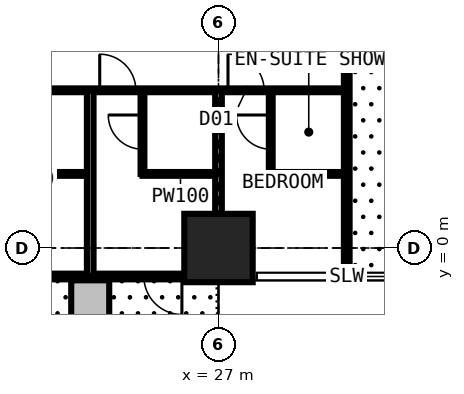
"""IFC4 building model, lengths in metres.
Left out: names, types, materials, properties, quantities, classifications, styles, units other than length and angle.
Written with IfcOpenShell. Run it as: python <this file> out.ifc"""

import sys

from ifc_helpers import new_model, si_unit, direction, frame, frame_2d, origin, origin_2d, place, context, subcontext, project, spatial, rectangle, extrude, element, fill, save


model = new_model("IFC4")
c1 = context("Model", 3, precision=1e-05, world=origin(), true_north=direction((0.0, 1.0)))
c2 = subcontext(c1, "Body", "Model", "MODEL_VIEW")
j1 = project(units=[si_unit("LENGTHUNIT", "METRE"), si_unit("PLANEANGLEUNIT", "RADIAN")], contexts=[c1])
p1 = place(None, origin())
s1 = spatial("IfcSite", under=j1, at=p1, CompositionType="ELEMENT")
p2 = place(p1, origin())
s2 = spatial("IfcBuilding", under=s1, at=p2, CompositionType="ELEMENT")
p3 = place(p2, frame((0.0, 0.0, 46.8)))
s3 = spatial("IfcBuildingStorey", under=s2, at=p3, CompositionType="ELEMENT", Elevation=46.8)
p4 = place(p3, frame((27.0, 0.0, 0.0), z_axis=(0.0, 0.0, 1.0), x_axis=(1.0, 0.0, 0.0)))
e1 = element("IfcColumn", 1, at=p4, inside=s3, PredefinedType="COLUMN", context=c2, shape_type="SweptSolid", body=[
    extrude(rectangle(XDim=1.8, YDim=1.8, at=origin_2d()), origin(), (0.0, 0.0, 1.0), 3.6),
])
p5 = place(p3, frame((27.0, -0.75, 0.0), z_axis=(0.0, 0.0, 1.0), x_axis=(-1.0, 0.0, 0.0)))
e2 = element("IfcWall", 2, at=p5, inside=s3, PredefinedType="SOLIDWALL", context=c2, shape_type="SweptSolid", body=[
    extrude(rectangle(XDim=6.75, YDim=0.15, at=frame_2d((3.375, 0.0))), origin(), (0.0, 0.0, 1.0), 3.375),
])
p6 = place(p5, frame((0.962, 0.0, 0.0)))
e3 = element("IfcOpeningElement", 3, at=p6, cuts=e2, PredefinedType="OPENING", context=c2, shape_type="SweptSolid", body=[
    extrude(rectangle(XDim=1.0, YDim=2.2, at=frame_2d((0.5, 1.1))), frame((0.0, 0.085, 0.0), z_axis=(0.0, -1.0, 0.0), x_axis=(1.0, 0.0, 0.0)), (0.0, 0.0, 1.0), 0.17),
])
p7 = place(p5, frame((2.025, 0.0, 0.9)))
e4 = element("IfcOpeningElement", 4, at=p7, cuts=e2, PredefinedType="OPENING", context=c2, shape_type="SweptSolid", body=[
    extrude(rectangle(XDim=1.2, YDim=1.8, at=frame_2d((0.6, 0.9))), frame((0.0, 0.085, 0.0), z_axis=(0.0, -1.0, 0.0), x_axis=(1.0, 0.0, 0.0)), (0.0, 0.0, 1.0), 0.17),
])
p8 = place(p5, frame((4.788, 0.0, 0.0)))
e5 = element("IfcOpeningElement", 5, at=p8, cuts=e2, PredefinedType="OPENING", context=c2, shape_type="SweptSolid", body=[
    extrude(rectangle(XDim=1.0, YDim=2.2, at=frame_2d((0.5, 1.1))), frame((0.0, 0.085, 0.0), z_axis=(0.0, -1.0, 0.0), x_axis=(1.0, 0.0, 0.0)), (0.0, 0.0, 1.0), 0.17),
])
p9 = place(p5, frame((3.525, 0.0, 0.9)))
e6 = element("IfcOpeningElement", 6, at=p9, cuts=e2, PredefinedType="OPENING", context=c2, shape_type="SweptSolid", body=[
    extrude(rectangle(XDim=1.2, YDim=1.8, at=frame_2d((0.6, 0.9))), frame((0.0, 0.085, 0.0), z_axis=(0.0, -1.0, 0.0), x_axis=(1.0, 0.0, 0.0)), (0.0, 0.0, 1.0), 0.17),
])
p10 = place(p3, frame((23.625, -0.85, 0.0), z_axis=(0.0, 0.0, 1.0), x_axis=(0.0, -1.0, 0.0)))
e7 = element("IfcWall", 7, at=p10, inside=s3, PredefinedType="USERDEFINED", context=c2, shape_type="SweptSolid", body=[
    extrude(rectangle(XDim=2.2, YDim=1.0, at=frame_2d((1.1, 0.0))), origin(), (0.0, 0.0, 1.0), 0.9),
])
p11 = place(p3, frame((6.75, 4.15, 0.0), z_axis=(0.0, 0.0, 1.0), x_axis=(1.0, 0.0, 0.0)))
e8 = element("IfcWall", 8, at=p11, inside=s3, PredefinedType="PARTITIONING", context=c2, shape_type="SweptSolid", body=[
    extrude(rectangle(XDim=23.625, YDim=0.1, at=frame_2d((11.812, 0.0))), origin(), (0.0, 0.0, 1.0), 3.375),
])
p12 = place(p11, frame((0.2, 0.0, 0.0)))
e9 = element("IfcOpeningElement", 9, at=p12, cuts=e8, PredefinedType="OPENING", context=c2, shape_type="SweptSolid", body=[
    extrude(rectangle(XDim=0.95, YDim=2.2, at=frame_2d((0.475, 1.1))), frame((0.0, 0.06, 0.0), z_axis=(0.0, -1.0, 0.0), x_axis=(1.0, 0.0, 0.0)), (0.0, 0.0, 1.0), 0.12),
])
p13 = place(p11, frame((3.625, 0.0, 0.0)))
e10 = element("IfcOpeningElement", 10, at=p13, cuts=e8, PredefinedType="OPENING", context=c2, shape_type="SweptSolid", body=[
    extrude(rectangle(XDim=0.95, YDim=2.2, at=frame_2d((0.475, 1.1))), frame((0.0, 0.06, 0.0), z_axis=(0.0, -1.0, 0.0), x_axis=(1.0, 0.0, 0.0)), (0.0, 0.0, 1.0), 0.12),
])
p14 = place(p11, frame((7.0, 0.0, 0.0)))
e11 = element("IfcOpeningElement", 11, at=p14, cuts=e8, PredefinedType="OPENING", context=c2, shape_type="SweptSolid", body=[
    extrude(rectangle(XDim=0.95, YDim=2.2, at=frame_2d((0.475, 1.1))), frame((0.0, 0.06, 0.0), z_axis=(0.0, -1.0, 0.0), x_axis=(1.0, 0.0, 0.0)), (0.0, 0.0, 1.0), 0.12),
])
p15 = place(p11, frame((10.375, 0.0, 0.0)))
e12 = element("IfcOpeningElement", 12, at=p15, cuts=e8, PredefinedType="OPENING", context=c2, shape_type="SweptSolid", body=[
    extrude(rectangle(XDim=0.95, YDim=2.2, at=frame_2d((0.475, 1.1))), frame((0.0, 0.06, 0.0), z_axis=(0.0, -1.0, 0.0), x_axis=(1.0, 0.0, 0.0)), (0.0, 0.0, 1.0), 0.12),
])
p16 = place(p11, frame((13.75, 0.0, 0.0)))
e13 = element("IfcOpeningElement", 13, at=p16, cuts=e8, PredefinedType="OPENING", context=c2, shape_type="SweptSolid", body=[
    extrude(rectangle(XDim=0.95, YDim=2.2, at=frame_2d((0.475, 1.1))), frame((0.0, 0.06, 0.0), z_axis=(0.0, -1.0, 0.0), x_axis=(1.0, 0.0, 0.0)), (0.0, 0.0, 1.0), 0.12),
])
p17 = place(p11, frame((17.125, 0.0, 0.0)))
e14 = element("IfcOpeningElement", 14, at=p17, cuts=e8, PredefinedType="OPENING", context=c2, shape_type="SweptSolid", body=[
    extrude(rectangle(XDim=0.95, YDim=2.2, at=frame_2d((0.475, 1.1))), frame((0.0, 0.06, 0.0), z_axis=(0.0, -1.0, 0.0), x_axis=(1.0, 0.0, 0.0)), (0.0, 0.0, 1.0), 0.12),
])
p18 = place(p11, frame((20.5, 0.0, 0.0)))
e15 = element("IfcOpeningElement", 15, at=p18, cuts=e8, PredefinedType="OPENING", context=c2, shape_type="SweptSolid", body=[
    extrude(rectangle(XDim=0.95, YDim=2.2, at=frame_2d((0.475, 1.1))), frame((0.0, 0.06, 0.0), z_axis=(0.0, -1.0, 0.0), x_axis=(1.0, 0.0, 0.0)), (0.0, 0.0, 1.0), 0.12),
])
p19 = place(p3, frame((21.625, 1.95, 0.0), z_axis=(0.0, 0.0, 1.0), x_axis=(1.0, 0.0, 0.0)))
e16 = element("IfcWall", 16, at=p19, inside=s3, PredefinedType="PARTITIONING", context=c2, shape_type="SweptSolid", body=[
    extrude(rectangle(XDim=2.0, YDim=0.1, at=frame_2d((1.0, 0.0))), origin(), (0.0, 0.0, 1.0), 3.375),
])
p20 = place(p3, frame((23.625, -0.734, 0.0), z_axis=(0.0, 0.0, 1.0), x_axis=(0.0, 1.0, 0.0)))
e17 = element("IfcWall", 17, at=p20, inside=s3, PredefinedType="PARTITIONING", context=c2, shape_type="SweptSolid", body=[
    extrude(rectangle(XDim=4.884, YDim=0.175, at=frame_2d((2.442, 0.0))), origin(), (0.0, 0.0, 1.0), 3.375),
])
p21 = place(p3, frame((25.0, 1.95, 0.0), z_axis=(0.0, 0.0, 1.0), x_axis=(0.0, 1.0, 0.0)))
e18 = element("IfcWall", 18, at=p21, inside=s3, PredefinedType="PARTITIONING", context=c2, shape_type="SweptSolid", body=[
    extrude(rectangle(XDim=2.2, YDim=0.1, at=frame_2d((1.1, 0.0))), origin(), (0.0, 0.0, 1.0), 3.375),
])
p22 = place(p21, frame((0.65, 0.0, 0.0)))
e19 = element("IfcOpeningElement", 19, at=p22, cuts=e18, PredefinedType="OPENING", context=c2, shape_type="SweptSolid", body=[
    extrude(rectangle(XDim=0.9, YDim=2.2, at=frame_2d((0.45, 1.1))), frame((0.0, 0.06, 0.0), z_axis=(0.0, -1.0, 0.0), x_axis=(1.0, 0.0, 0.0)), (0.0, 0.0, 1.0), 0.12),
])
p23 = place(p3, frame((25.0, 1.95, 0.0), z_axis=(0.0, 0.0, 1.0), x_axis=(1.0, 0.0, 0.0)))
e20 = element("IfcWall", 20, at=p23, inside=s3, PredefinedType="PARTITIONING", context=c2, shape_type="SweptSolid", body=[
    extrude(rectangle(XDim=2.0, YDim=0.1, at=frame_2d((1.0, 0.0))), origin(), (0.0, 0.0, 1.0), 3.375),
])
p24 = place(p3, frame((27.0, -0.734, 0.0), z_axis=(0.0, 0.0, 1.0), x_axis=(0.0, 1.0, 0.0)))
e21 = element("IfcWall", 21, at=p24, inside=s3, PredefinedType="PARTITIONING", context=c2, shape_type="SweptSolid", body=[
    extrude(rectangle(XDim=4.884, YDim=0.175, at=frame_2d((2.442, 0.0))), origin(), (0.0, 0.0, 1.0), 2.61),
])
p25 = place(p3, frame((28.375, 1.95, 0.0), z_axis=(0.0, 0.0, 1.0), x_axis=(0.0, 1.0, 0.0)))
e22 = element("IfcWall", 22, at=p25, inside=s3, PredefinedType="PARTITIONING", context=c2, shape_type="SweptSolid", body=[
    extrude(rectangle(XDim=2.2, YDim=0.1, at=frame_2d((1.1, 0.0))), origin(), (0.0, 0.0, 1.0), 3.375),
])
p26 = place(p25, frame((0.65, 0.0, 0.0)))
e23 = element("IfcOpeningElement", 23, at=p26, cuts=e22, PredefinedType="OPENING", context=c2, shape_type="SweptSolid", body=[
    extrude(rectangle(XDim=0.9, YDim=2.2, at=frame_2d((0.45, 1.1))), frame((0.0, 0.06, 0.0), z_axis=(0.0, -1.0, 0.0), x_axis=(1.0, 0.0, 0.0)), (0.0, 0.0, 1.0), 0.12),
])
p27 = place(p3, frame((28.375, 1.95, 0.0), z_axis=(0.0, 0.0, 1.0), x_axis=(1.0, 0.0, 0.0)))
e24 = element("IfcWall", 24, at=p27, inside=s3, PredefinedType="PARTITIONING", context=c2, shape_type="SweptSolid", body=[
    extrude(rectangle(XDim=2.0, YDim=0.1, at=frame_2d((1.0, 0.0))), origin(), (0.0, 0.0, 1.0), 3.375),
])
p28 = place(p3, frame((30.375, -0.734, 0.0), z_axis=(0.0, 0.0, 1.0), x_axis=(0.0, 1.0, 0.0)))
e25 = element("IfcWall", 25, at=p28, inside=s3, PredefinedType="PARTITIONING", context=c2, shape_type="SweptSolid", body=[
    extrude(rectangle(XDim=12.034, YDim=0.15, at=frame_2d((6.017, 0.0))), origin(), (0.0, 0.0, 1.0), 3.375),
])
p29 = place(p6, origin())
e26 = element("IfcDoor", 26, at=p29, inside=s3, OperationType="SINGLE_SWING_LEFT", PredefinedType="DOOR", context=c2, shape_type="SweptSolid", body=[
    extrude(rectangle(XDim=1.0, YDim=2.2, at=frame_2d((0.5, 1.1))), frame((0.0, 0.025, 0.0), z_axis=(0.0, -1.0, 0.0), x_axis=(1.0, 0.0, 0.0)), (0.0, 0.0, 1.0), 0.05),
])
fill(e3, e26)
p30 = place(p7, origin())
e27 = element("IfcWindow", 27, at=p30, inside=s3, PartitioningType="SINGLE_PANEL", PredefinedType="WINDOW", context=c2, shape_type="SweptSolid", body=[
    extrude(rectangle(XDim=1.2, YDim=1.8, at=frame_2d((0.6, 0.9))), frame((0.0, 0.03, 0.0), z_axis=(0.0, -1.0, 0.0), x_axis=(1.0, 0.0, 0.0)), (0.0, 0.0, 1.0), 0.06),
])
fill(e4, e27)
p31 = place(p9, origin())
e28 = element("IfcWindow", 28, at=p31, inside=s3, PartitioningType="SINGLE_PANEL", PredefinedType="WINDOW", context=c2, shape_type="SweptSolid", body=[
    extrude(rectangle(XDim=1.2, YDim=1.8, at=frame_2d((0.6, 0.9))), frame((0.0, 0.03, 0.0), z_axis=(0.0, -1.0, 0.0), x_axis=(1.0, 0.0, 0.0)), (0.0, 0.0, 1.0), 0.06),
])
fill(e6, e28)
p32 = place(p17, origin())
e29 = element("IfcDoor", 29, at=p32, inside=s3, OperationType="SINGLE_SWING_LEFT", PredefinedType="DOOR", context=c2, shape_type="SweptSolid", body=[
    extrude(rectangle(XDim=0.95, YDim=2.2, at=frame_2d((0.475, 1.1))), frame((0.0, 0.025, 0.0), z_axis=(0.0, -1.0, 0.0), x_axis=(1.0, 0.0, 0.0)), (0.0, 0.0, 1.0), 0.05),
])
fill(e14, e29)
p33 = place(p22, origin())
e30 = element("IfcDoor", 30, at=p33, inside=s3, OperationType="SINGLE_SWING_RIGHT", PredefinedType="DOOR", context=c2, shape_type="SweptSolid", body=[
    extrude(rectangle(XDim=0.9, YDim=2.2, at=frame_2d((0.45, 1.1))), frame((0.0, 0.025, 0.0), z_axis=(0.0, -1.0, 0.0), x_axis=(1.0, 0.0, 0.0)), (0.0, 0.0, 1.0), 0.05),
])
fill(e19, e30)
p34 = place(p18, origin())
e31 = element("IfcDoor", 31, at=p34, inside=s3, OperationType="SINGLE_SWING_LEFT", PredefinedType="DOOR", context=c2, shape_type="SweptSolid", body=[
    extrude(rectangle(XDim=0.95, YDim=2.2, at=frame_2d((0.475, 1.1))), frame((0.0, 0.025, 0.0), z_axis=(0.0, -1.0, 0.0), x_axis=(1.0, 0.0, 0.0)), (0.0, 0.0, 1.0), 0.05),
])
fill(e15, e31)
p35 = place(p26, origin())
e32 = element("IfcDoor", 32, at=p35, inside=s3, OperationType="SINGLE_SWING_RIGHT", PredefinedType="DOOR", context=c2, shape_type="SweptSolid", body=[
    extrude(rectangle(XDim=0.9, YDim=2.2, at=frame_2d((0.45, 1.1))), frame((0.0, 0.025, 0.0), z_axis=(0.0, -1.0, 0.0), x_axis=(1.0, 0.0, 0.0)), (0.0, 0.0, 1.0), 0.05),
])
fill(e23, e32)
save(model, sys.argv[1])
